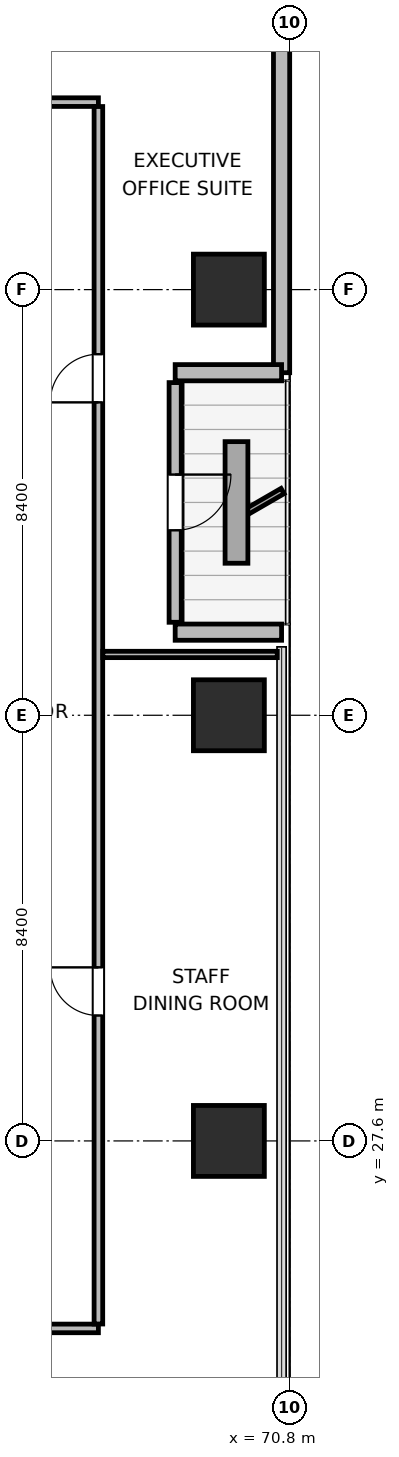
"""IFC4 building model, lengths in metres.
Left out: names, types, materials, properties, quantities, classifications, styles, units other than length and angle.
Written with IfcOpenShell. Run it as: python <this file> out.ifc"""

import sys

from ifc_helpers import new_model, si_unit, direction, frame, frame_2d, origin, origin_2d, place, context, subcontext, project, spatial, rectangle, extrude, element, fill, save


model = new_model("IFC4")
c1 = context("Model", 3, precision=1e-05, world=origin(), true_north=direction((0.0, 1.0)))
c2 = subcontext(c1, "Body", "Model", "MODEL_VIEW")
j1 = project(units=[si_unit("LENGTHUNIT", "METRE"), si_unit("PLANEANGLEUNIT", "RADIAN")], contexts=[c1])
p1 = place(None, origin())
s1 = spatial("IfcSite", under=j1, at=p1, CompositionType="ELEMENT")
p2 = place(p1, origin())
s2 = spatial("IfcBuilding", under=s1, at=p2, CompositionType="ELEMENT")
p3 = place(p2, frame((0.0, 0.0, 101.4)))
s3 = spatial("IfcBuildingStorey", under=s2, at=p3, CompositionType="ELEMENT", Elevation=101.4)
for number, where, z_axis, x_axis in (
    (1, (69.6, 27.6, 0.0), (0.0, 0.0, 1.0), (1.0, 0.0, 0.0)),
    (2, (69.6, 36.0, 0.0), (0.0, 0.0, 1.0), (1.0, 0.0, 0.0)),
    (3, (69.6, 44.4, 0.0), (0.0, 0.0, 1.0), (1.0, 0.0, 0.0)),
):
    element("IfcColumn", number, at=place(p3, frame(where, z_axis=z_axis, x_axis=x_axis)), inside=s3, PredefinedType="COLUMN", context=c2, shape_type="SweptSolid", body=[
        extrude(rectangle(XDim=1.4, YDim=1.4, at=origin_2d()), origin(), (0.0, 0.0, 1.0), 3.9),
    ])
p4 = place(p3, frame((70.64, 56.979, 0.0), z_axis=(0.0, 0.0, 1.0), x_axis=(0.0, -1.0, 0.0)))
e4 = element("IfcWall", 4, at=p4, inside=s3, PredefinedType="SOLIDWALL", context=c2, shape_type="SweptSolid", body=[
    extrude(rectangle(XDim=14.219, YDim=0.32, at=frame_2d((7.109, 0.0))), origin(), (0.0, 0.0, 1.0), 3.64),
])
p5 = place(p3, frame((70.64, 42.76, 0.0), z_axis=(0.0, 0.0, 1.0), x_axis=(-1.0, 0.0, 0.0)))
e5 = element("IfcWall", 5, at=p5, inside=s3, PredefinedType="SOLIDWALL", context=c2, shape_type="SweptSolid", body=[
    extrude(rectangle(XDim=2.1, YDim=0.32, at=frame_2d((1.05, 0.0))), origin(), (0.0, 0.0, 1.0), 2.875),
])
p6 = place(p3, frame((68.54, 42.565, 0.0), z_axis=(0.0, 0.0, 1.0), x_axis=(0.0, -1.0, 0.0)))
e6 = element("IfcWall", 6, at=p6, inside=s3, PredefinedType="SOLIDWALL", context=c2, shape_type="SweptSolid", body=[
    extrude(rectangle(XDim=4.73, YDim=0.24, at=frame_2d((2.365, 0.0))), origin(), (0.0, 0.0, 1.0), 3.162),
])
p7 = place(p6, frame((1.815, 0.0, 0.0)))
e7 = element("IfcOpeningElement", 7, at=p7, cuts=e6, PredefinedType="OPENING", context=c2, shape_type="SweptSolid", body=[
    extrude(rectangle(XDim=1.1, YDim=2.04, at=frame_2d((0.55, 1.02))), frame((0.0, 0.13, 0.0), z_axis=(0.0, -1.0, 0.0), x_axis=(1.0, 0.0, 0.0)), (0.0, 0.0, 1.0), 0.26),
])
p8 = place(p3, frame((68.54, 37.64, 0.0), z_axis=(0.0, 0.0, 1.0), x_axis=(1.0, 0.0, 0.0)))
e8 = element("IfcWall", 8, at=p8, inside=s3, PredefinedType="SOLIDWALL", context=c2, shape_type="SweptSolid", body=[
    extrude(rectangle(XDim=2.1, YDim=0.32, at=frame_2d((1.05, 0.0))), origin(), (0.0, 0.0, 1.0), 2.875),
])
p9 = place(p3, frame((28.975, 23.9, 0.0), z_axis=(0.0, 0.0, 1.0), x_axis=(1.0, 0.0, 0.0)))
e9 = element("IfcWall", 9, at=p9, inside=s3, PredefinedType="PARTITIONING", context=c2, shape_type="SweptSolid", body=[
    extrude(rectangle(XDim=38.05, YDim=0.17, at=frame_2d((19.025, 0.0))), origin(), (0.0, 0.0, 1.0), 3.64),
])
p10 = place(p9, frame((3.097, 0.0, 0.0)))
e10 = element("IfcOpeningElement", 10, at=p10, cuts=e9, PredefinedType="OPENING", context=c2, shape_type="SweptSolid", body=[
    extrude(rectangle(XDim=0.95, YDim=2.04, at=frame_2d((0.475, 1.02))), frame((0.0, 0.095, 0.0), z_axis=(0.0, -1.0, 0.0), x_axis=(1.0, 0.0, 0.0)), (0.0, 0.0, 1.0), 0.19),
])
p11 = place(p9, frame((9.64, 0.0, 0.0)))
e11 = element("IfcOpeningElement", 11, at=p11, cuts=e9, PredefinedType="OPENING", context=c2, shape_type="SweptSolid", body=[
    extrude(rectangle(XDim=0.95, YDim=2.04, at=frame_2d((0.475, 1.02))), frame((0.0, 0.095, 0.0), z_axis=(0.0, -1.0, 0.0), x_axis=(1.0, 0.0, 0.0)), (0.0, 0.0, 1.0), 0.19),
])
p12 = place(p9, frame((15.58, 0.0, 0.0)))
e12 = element("IfcOpeningElement", 12, at=p12, cuts=e9, PredefinedType="OPENING", context=c2, shape_type="SweptSolid", body=[
    extrude(rectangle(XDim=0.95, YDim=2.04, at=frame_2d((0.475, 1.02))), frame((0.0, 0.095, 0.0), z_axis=(0.0, -1.0, 0.0), x_axis=(1.0, 0.0, 0.0)), (0.0, 0.0, 1.0), 0.19),
])
p13 = place(p9, frame((21.52, 0.0, 0.0)))
e13 = element("IfcOpeningElement", 13, at=p13, cuts=e9, PredefinedType="OPENING", context=c2, shape_type="SweptSolid", body=[
    extrude(rectangle(XDim=0.95, YDim=2.04, at=frame_2d((0.475, 1.02))), frame((0.0, 0.095, 0.0), z_axis=(0.0, -1.0, 0.0), x_axis=(1.0, 0.0, 0.0)), (0.0, 0.0, 1.0), 0.19),
])
p14 = place(p9, frame((27.46, 0.0, 0.0)))
e14 = element("IfcOpeningElement", 14, at=p14, cuts=e9, PredefinedType="OPENING", context=c2, shape_type="SweptSolid", body=[
    extrude(rectangle(XDim=0.95, YDim=2.04, at=frame_2d((0.475, 1.02))), frame((0.0, 0.095, 0.0), z_axis=(0.0, -1.0, 0.0), x_axis=(1.0, 0.0, 0.0)), (0.0, 0.0, 1.0), 0.19),
])
p15 = place(p9, frame((34.003, 0.0, 0.0)))
e15 = element("IfcOpeningElement", 15, at=p15, cuts=e9, PredefinedType="OPENING", context=c2, shape_type="SweptSolid", body=[
    extrude(rectangle(XDim=0.95, YDim=2.04, at=frame_2d((0.475, 1.02))), frame((0.0, 0.095, 0.0), z_axis=(0.0, -1.0, 0.0), x_axis=(1.0, 0.0, 0.0)), (0.0, 0.0, 1.0), 0.19),
])
p16 = place(p3, frame((28.975, 48.1, 0.0), z_axis=(0.0, 0.0, 1.0), x_axis=(1.0, 0.0, 0.0)))
e16 = element("IfcWall", 16, at=p16, inside=s3, PredefinedType="PARTITIONING", context=c2, shape_type="SweptSolid", body=[
    extrude(rectangle(XDim=38.05, YDim=0.17, at=frame_2d((19.025, 0.0))), origin(), (0.0, 0.0, 1.0), 3.64),
])
p17 = place(p16, frame((4.923, 0.0, 0.0)))
e17 = element("IfcOpeningElement", 17, at=p17, cuts=e16, PredefinedType="OPENING", context=c2, shape_type="SweptSolid", body=[
    extrude(rectangle(XDim=0.95, YDim=2.04, at=frame_2d((0.475, 1.02))), frame((0.0, 0.095, 0.0), z_axis=(0.0, -1.0, 0.0), x_axis=(1.0, 0.0, 0.0)), (0.0, 0.0, 1.0), 0.19),
])
p18 = place(p16, frame((13.34, 0.0, 0.0)))
e18 = element("IfcOpeningElement", 18, at=p18, cuts=e16, PredefinedType="OPENING", context=c2, shape_type="SweptSolid", body=[
    extrude(rectangle(XDim=0.95, YDim=2.04, at=frame_2d((0.475, 1.02))), frame((0.0, 0.095, 0.0), z_axis=(0.0, -1.0, 0.0), x_axis=(1.0, 0.0, 0.0)), (0.0, 0.0, 1.0), 0.19),
])
p19 = place(p16, frame((20.06, 0.0, 0.0)))
e19 = element("IfcOpeningElement", 19, at=p19, cuts=e16, PredefinedType="OPENING", context=c2, shape_type="SweptSolid", body=[
    extrude(rectangle(XDim=0.95, YDim=2.04, at=frame_2d((0.475, 1.02))), frame((0.0, 0.095, 0.0), z_axis=(0.0, -1.0, 0.0), x_axis=(1.0, 0.0, 0.0)), (0.0, 0.0, 1.0), 0.19),
])
p20 = place(p16, frame((25.27, 0.0, 0.0)))
e20 = element("IfcOpeningElement", 20, at=p20, cuts=e16, PredefinedType="OPENING", context=c2, shape_type="SweptSolid", body=[
    extrude(rectangle(XDim=0.95, YDim=2.04, at=frame_2d((0.475, 1.02))), frame((0.0, 0.095, 0.0), z_axis=(0.0, -1.0, 0.0), x_axis=(1.0, 0.0, 0.0)), (0.0, 0.0, 1.0), 0.19),
])
p21 = place(p16, frame((32.178, 0.0, 0.0)))
e21 = element("IfcOpeningElement", 21, at=p21, cuts=e16, PredefinedType="OPENING", context=c2, shape_type="SweptSolid", body=[
    extrude(rectangle(XDim=0.95, YDim=2.04, at=frame_2d((0.475, 1.02))), frame((0.0, 0.095, 0.0), z_axis=(0.0, -1.0, 0.0), x_axis=(1.0, 0.0, 0.0)), (0.0, 0.0, 1.0), 0.19),
])
p22 = place(p3, frame((67.025, 23.987, 0.0), z_axis=(0.0, 0.0, 1.0), x_axis=(0.0, 1.0, 0.0)))
e22 = element("IfcWall", 22, at=p22, inside=s3, PredefinedType="PARTITIONING", context=c2, shape_type="SweptSolid", body=[
    extrude(rectangle(XDim=24.026, YDim=0.17, at=frame_2d((12.013, 0.0))), origin(), (0.0, 0.0, 1.0), 3.64),
])
p23 = place(p22, frame((6.088, 0.0, 0.0)))
e23 = element("IfcOpeningElement", 23, at=p23, cuts=e22, PredefinedType="OPENING", context=c2, shape_type="SweptSolid", body=[
    extrude(rectangle(XDim=0.95, YDim=2.04, at=frame_2d((0.475, 1.02))), frame((0.0, 0.095, 0.0), z_axis=(0.0, -1.0, 0.0), x_axis=(1.0, 0.0, 0.0)), (0.0, 0.0, 1.0), 0.19),
])
p24 = place(p22, frame((18.188, 0.0, 0.0)))
e24 = element("IfcOpeningElement", 24, at=p24, cuts=e22, PredefinedType="OPENING", context=c2, shape_type="SweptSolid", body=[
    extrude(rectangle(XDim=0.95, YDim=2.04, at=frame_2d((0.475, 1.02))), frame((0.0, 0.095, 0.0), z_axis=(0.0, -1.0, 0.0), x_axis=(1.0, 0.0, 0.0)), (0.0, 0.0, 1.0), 0.19),
])
p25 = place(p3, frame((67.112, 37.2, 0.0), z_axis=(0.0, 0.0, 1.0), x_axis=(1.0, 0.0, 0.0)))
e25 = element("IfcWall", 25, at=p25, inside=s3, PredefinedType="PARTITIONING", context=c2, shape_type="SweptSolid", body=[
    extrude(rectangle(XDim=3.443, YDim=0.125, at=frame_2d((1.721, 0.0))), origin(), (0.0, 0.0, 1.0), 3.64),
])
p26 = place(p7, origin())
e26 = element("IfcDoor", 26, at=p26, inside=s3, OperationType="SINGLE_SWING_LEFT", PredefinedType="DOOR", context=c2, shape_type="SweptSolid", body=[
    extrude(rectangle(XDim=1.1, YDim=2.04, at=frame_2d((0.55, 1.02))), frame((0.0, 0.025, 0.0), z_axis=(0.0, -1.0, 0.0), x_axis=(1.0, 0.0, 0.0)), (0.0, 0.0, 1.0), 0.05),
])
fill(e7, e26)
p27 = place(p23, origin())
e27 = element("IfcDoor", 27, at=p27, inside=s3, OperationType="SINGLE_SWING_RIGHT", PredefinedType="DOOR", context=c2, shape_type="SweptSolid", body=[
    extrude(rectangle(XDim=0.95, YDim=2.04, at=frame_2d((0.475, 1.02))), frame((0.0, 0.025, 0.0), z_axis=(0.0, -1.0, 0.0), x_axis=(1.0, 0.0, 0.0)), (0.0, 0.0, 1.0), 0.05),
])
fill(e23, e27)
p28 = place(p24, origin())
e28 = element("IfcDoor", 28, at=p28, inside=s3, OperationType="SINGLE_SWING_LEFT", PredefinedType="DOOR", context=c2, shape_type="SweptSolid", body=[
    extrude(rectangle(XDim=0.95, YDim=2.04, at=frame_2d((0.475, 1.02))), frame((0.0, 0.025, 0.0), z_axis=(0.0, -1.0, 0.0), x_axis=(1.0, 0.0, 0.0)), (0.0, 0.0, 1.0), 0.05),
])
fill(e24, e28)
save(model, sys.argv[1])
